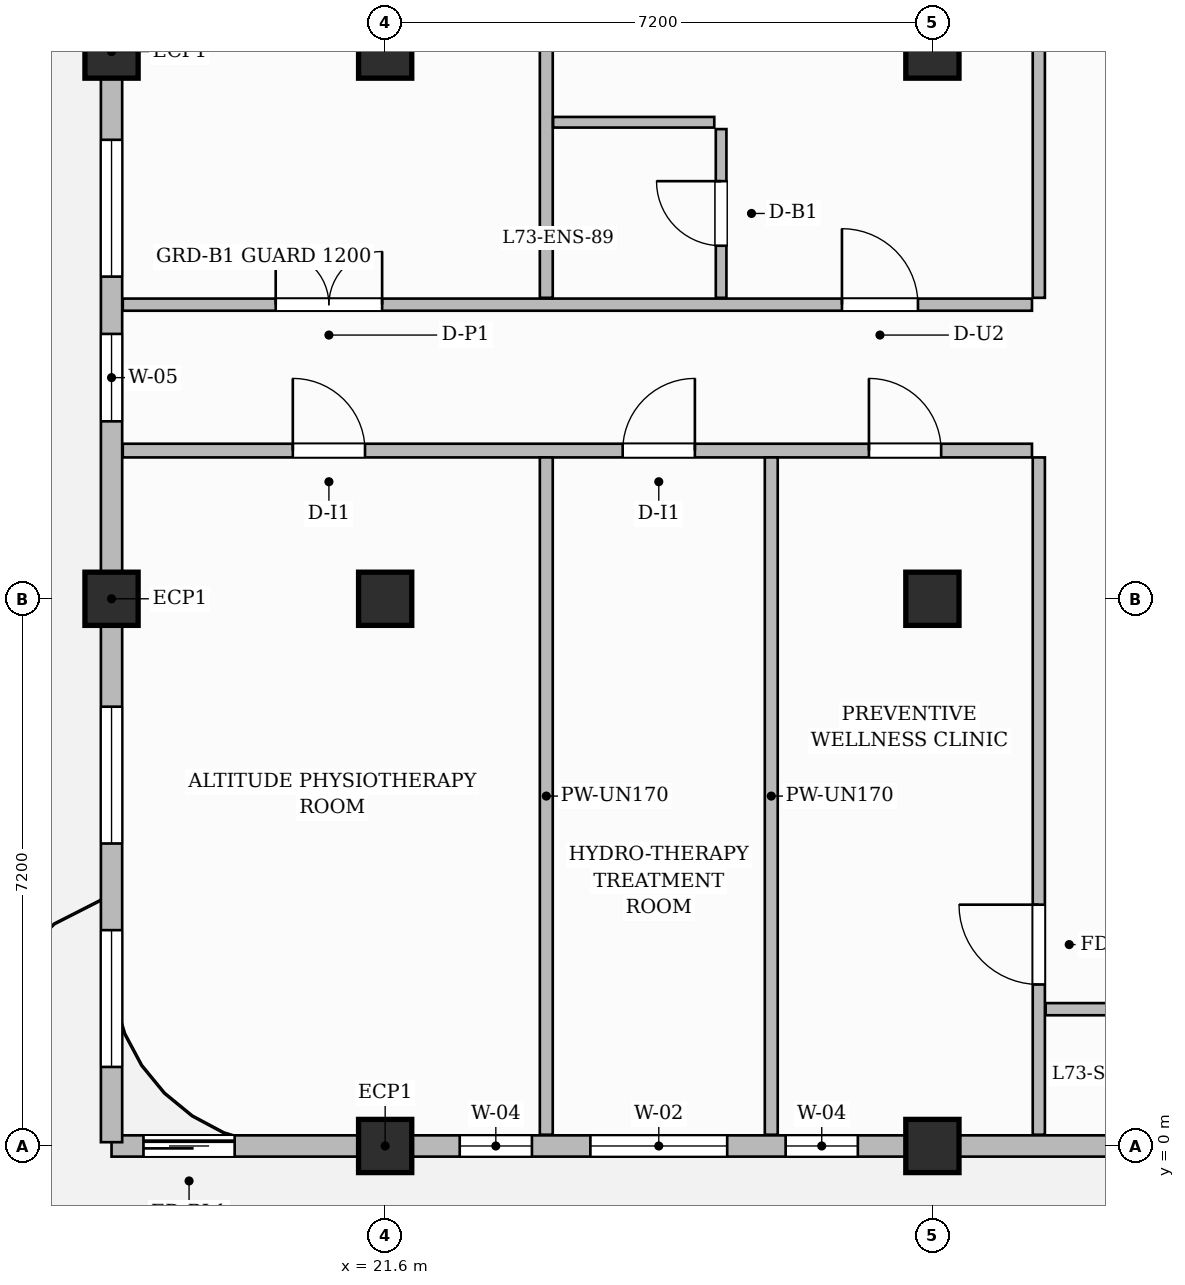
"""IFC4 building model, lengths in metres.
Left out: names, types, materials, properties, quantities, classifications, styles, units other than length and angle.
Written with IfcOpenShell. Run it as: python <this file> out.ifc"""

import sys

from ifc_helpers import new_model, si_unit, direction, frame, frame_2d, origin, origin_2d, place, context, subcontext, project, spatial, rectangle, extrude, source, transform, mapped, element, fill, save


model = new_model("IFC4")
c1 = context("Model", 3, precision=1e-05, world=origin(), true_north=direction((0.0, 1.0)))
c2 = subcontext(c1, "Body", "Model", "MODEL_VIEW")
j1 = project(units=[si_unit("LENGTHUNIT", "METRE"), si_unit("PLANEANGLEUNIT", "RADIAN")], contexts=[c1])
p1 = place(None, origin())
s1 = spatial("IfcSite", under=j1, at=p1, CompositionType="ELEMENT")
p2 = place(p1, origin())
s2 = spatial("IfcBuilding", under=s1, at=p2, CompositionType="ELEMENT")
p3 = place(p2, frame((0.0, 0.0, 290.45)))
s3 = spatial("IfcBuildingStorey", under=s2, at=p3, CompositionType="ELEMENT", Elevation=290.45)
m1 = source(origin(), c2, "Body", "SweptSolid", [
    extrude(rectangle(XDim=0.7, YDim=0.7, at=origin_2d()), origin(), (0.0, 0.0, 1.0), 3.85),
])
for number, where, z_axis, x_axis in (
    (1, (21.6, 0.0, 0.0), (0.0, 0.0, 1.0), (1.0, 0.0, 0.0)),
    (2, (21.6, 7.2, 0.0), (0.0, 0.0, 1.0), (1.0, 0.0, 0.0)),
    (3, (21.6, 14.4, 0.0), (0.0, 0.0, 1.0), (1.0, 0.0, 0.0)),
    (4, (28.8, 0.0, 0.0), (0.0, 0.0, 1.0), (1.0, 0.0, 0.0)),
    (5, (28.8, 7.2, 0.0), (0.0, 0.0, 1.0), (1.0, 0.0, 0.0)),
    (6, (28.8, 14.4, 0.0), (0.0, 0.0, 1.0), (1.0, 0.0, 0.0)),
    (7, (18.0, 7.2, 0.0), (0.0, 0.0, 1.0), (1.0, 0.0, 0.0)),
    (8, (18.0, 14.4, 0.0), (0.0, 0.0, 1.0), (1.0, 0.0, 0.0)),
):
    element("IfcColumn", number, at=place(p3, frame(where, z_axis=z_axis, x_axis=x_axis)), inside=s3, PredefinedType="COLUMN", context=c2, shape_type="MappedRepresentation", body=[
        mapped(m1, transform((0.0, 0.0, 0.0), scale=1.0)),
    ])
p4 = place(p3, frame((18.148, 9.15, 0.0), z_axis=(0.0, 0.0, 1.0), x_axis=(1.0, 0.0, 0.0)))
e9 = element("IfcWall", 9, at=p4, inside=s3, PredefinedType="PARTITIONING", context=c2, shape_type="SweptSolid", body=[
    extrude(rectangle(XDim=11.962, YDim=0.18, at=frame_2d((5.981, 0.0))), origin(), (0.0, 0.0, 1.0), 3.55),
])
p5 = place(p4, frame((2.237, 0.0, 0.0)))
e10 = element("IfcOpeningElement", 10, at=p5, cuts=e9, PredefinedType="OPENING", context=c2, shape_type="SweptSolid", body=[
    extrude(rectangle(XDim=0.95, YDim=2.15, at=frame_2d((0.475, 1.075))), frame((0.0, 0.1, 0.0), z_axis=(0.0, -1.0, 0.0), x_axis=(1.0, 0.0, 0.0)), (0.0, 0.0, 1.0), 0.2),
])
p6 = place(p4, frame((6.577, 0.0, 0.0)))
e11 = element("IfcOpeningElement", 11, at=p6, cuts=e9, PredefinedType="OPENING", context=c2, shape_type="SweptSolid", body=[
    extrude(rectangle(XDim=0.95, YDim=2.15, at=frame_2d((0.475, 1.075))), frame((0.0, 0.1, 0.0), z_axis=(0.0, -1.0, 0.0), x_axis=(1.0, 0.0, 0.0)), (0.0, 0.0, 1.0), 0.2),
])
p7 = place(p4, frame((9.817, 0.0, 0.0)))
e12 = element("IfcOpeningElement", 12, at=p7, cuts=e9, PredefinedType="OPENING", context=c2, shape_type="SweptSolid", body=[
    extrude(rectangle(XDim=0.95, YDim=2.15, at=frame_2d((0.475, 1.075))), frame((0.0, 0.1, 0.0), z_axis=(0.0, -1.0, 0.0), x_axis=(1.0, 0.0, 0.0)), (0.0, 0.0, 1.0), 0.2),
])
p8 = place(p3, frame((18.148, 11.07, 0.0), z_axis=(0.0, 0.0, 1.0), x_axis=(1.0, 0.0, 0.0)))
e13 = element("IfcWall", 13, at=p8, inside=s3, PredefinedType="PARTITIONING", context=c2, shape_type="SweptSolid", body=[
    extrude(rectangle(XDim=11.962, YDim=0.16, at=frame_2d((5.981, 0.0))), origin(), (0.0, 0.0, 1.0), 3.55),
])
p9 = place(p8, frame((2.012, 0.0, 0.0)))
e14 = element("IfcOpeningElement", 14, at=p9, cuts=e13, PredefinedType="OPENING", context=c2, shape_type="SweptSolid", body=[
    extrude(rectangle(XDim=1.4, YDim=2.35, at=frame_2d((0.7, 1.175))), frame((0.0, 0.09, 0.0), z_axis=(0.0, -1.0, 0.0), x_axis=(1.0, 0.0, 0.0)), (0.0, 0.0, 1.0), 0.18),
])
p10 = place(p8, frame((9.462, 0.0, 0.0)))
e15 = element("IfcOpeningElement", 15, at=p10, cuts=e13, PredefinedType="OPENING", context=c2, shape_type="SweptSolid", body=[
    extrude(rectangle(XDim=1.0, YDim=2.2, at=frame_2d((0.5, 1.1))), frame((0.0, 0.09, 0.0), z_axis=(0.0, -1.0, 0.0), x_axis=(1.0, 0.0, 0.0)), (0.0, 0.0, 1.0), 0.18),
])
p11 = place(p3, frame((30.2, 11.16, 0.0), z_axis=(0.0, 0.0, 1.0), x_axis=(0.0, 1.0, 0.0)))
e16 = element("IfcWall", 16, at=p11, inside=s3, PredefinedType="PARTITIONING", context=c2, shape_type="SweptSolid", body=[
    extrude(rectangle(XDim=10.3, YDim=0.16, at=frame_2d((5.15, 0.0))), origin(), (0.0, 0.0, 1.0), 3.55),
])
p12 = place(p3, frame((30.2, 0.148, 0.0), z_axis=(0.0, 0.0, 1.0), x_axis=(0.0, 1.0, 0.0)))
e17 = element("IfcWall", 17, at=p12, inside=s3, PredefinedType="PARTITIONING", context=c2, shape_type="SweptSolid", body=[
    extrude(rectangle(XDim=8.912, YDim=0.16, at=frame_2d((4.456, 0.0))), origin(), (0.0, 0.0, 1.0), 3.55),
])
p13 = place(p12, frame((1.977, 0.0, 0.0)))
e18 = element("IfcOpeningElement", 18, at=p13, cuts=e17, PredefinedType="OPENING", context=c2, shape_type="SweptSolid", body=[
    extrude(rectangle(XDim=1.05, YDim=2.15, at=frame_2d((0.525, 1.075))), frame((0.0, 0.09, 0.0), z_axis=(0.0, -1.0, 0.0), x_axis=(1.0, 0.0, 0.0)), (0.0, 0.0, 1.0), 0.18),
])
p14 = place(p3, frame((30.29, 1.8, 0.0), z_axis=(0.0, 0.0, 1.0), x_axis=(1.0, 0.0, 0.0)))
e19 = element("IfcWall", 19, at=p14, inside=s3, PredefinedType="PARTITIONING", context=c2, shape_type="SweptSolid", body=[
    extrude(rectangle(XDim=19.37, YDim=0.16, at=frame_2d((9.685, 0.0))), origin(), (0.0, 0.0, 1.0), 3.55),
])
p15 = place(p14, frame((5.074, 0.0, 0.0)))
e20 = element("IfcOpeningElement", 20, at=p15, cuts=e19, PredefinedType="OPENING", context=c2, shape_type="SweptSolid", body=[
    extrude(rectangle(XDim=0.9, YDim=2.15, at=frame_2d((0.45, 1.075))), frame((0.0, 0.09, 0.0), z_axis=(0.0, -1.0, 0.0), x_axis=(1.0, 0.0, 0.0)), (0.0, 0.0, 1.0), 0.18),
])
p16 = place(p14, frame((14.06, 0.0, 0.0)))
e21 = element("IfcOpeningElement", 21, at=p16, cuts=e19, PredefinedType="OPENING", context=c2, shape_type="SweptSolid", body=[
    extrude(rectangle(XDim=0.9, YDim=2.15, at=frame_2d((0.45, 1.075))), frame((0.0, 0.09, 0.0), z_axis=(0.0, -1.0, 0.0), x_axis=(1.0, 0.0, 0.0)), (0.0, 0.0, 1.0), 0.18),
])
for number, where, z_axis, x_axis in (
    (22, (23.72, 0.148, 0.0), (0.0, 0.0, 1.0), (0.0, 1.0, 0.0)),
    (23, (26.68, 0.148, 0.0), (0.0, 0.0, 1.0), (0.0, 1.0, 0.0)),
):
    element("IfcWall", number, at=place(p3, frame(where, z_axis=z_axis, x_axis=x_axis)), inside=s3, PredefinedType="PARTITIONING", context=c2, shape_type="SweptSolid", body=[
        extrude(rectangle(XDim=8.912, YDim=0.17, at=frame_2d((4.456, 0.0))), origin(), (0.0, 0.0, 1.0), 3.55),
    ])
p17 = place(p3, frame((23.72, 11.16, 0.0), z_axis=(0.0, 0.0, 1.0), x_axis=(0.0, 1.0, 0.0)))
e24 = element("IfcWall", 24, at=p17, inside=s3, PredefinedType="PARTITIONING", context=c2, shape_type="SweptSolid", body=[
    extrude(rectangle(XDim=10.292, YDim=0.17, at=frame_2d((5.146, 0.0))), origin(), (0.0, 0.0, 1.0), 3.55),
])
p18 = place(p3, frame((26.02, 11.16, 0.0), z_axis=(0.0, 0.0, 1.0), x_axis=(0.0, 1.0, 0.0)))
e25 = element("IfcWall", 25, at=p18, inside=s3, PredefinedType="PARTITIONING", context=c2, shape_type="SweptSolid", body=[
    extrude(rectangle(XDim=2.22, YDim=0.14, at=frame_2d((1.11, 0.0))), origin(), (0.0, 0.0, 1.0), 3.55),
])
p19 = place(p18, frame((0.685, 0.0, 0.0)))
e26 = element("IfcOpeningElement", 26, at=p19, cuts=e25, PredefinedType="OPENING", context=c2, shape_type="SweptSolid", body=[
    extrude(rectangle(XDim=0.85, YDim=2.1, at=frame_2d((0.425, 1.05))), frame((0.0, 0.08, 0.0), z_axis=(0.0, -1.0, 0.0), x_axis=(1.0, 0.0, 0.0)), (0.0, 0.0, 1.0), 0.16),
])
p20 = place(p3, frame((23.81, 13.47, 0.0), z_axis=(0.0, 0.0, 1.0), x_axis=(1.0, 0.0, 0.0)))
e27 = element("IfcWall", 27, at=p20, inside=s3, PredefinedType="PARTITIONING", context=c2, shape_type="SweptSolid", body=[
    extrude(rectangle(XDim=2.12, YDim=0.14, at=frame_2d((1.06, 0.0))), origin(), (0.0, 0.0, 1.0), 3.55),
])
p21 = place(p3, frame((18.0, 0.0, 0.0), z_axis=(0.0, 0.0, 1.0), x_axis=(1.0, 0.0, 0.0)))
e28 = element("IfcWall", 28, at=p21, inside=s3, PredefinedType="SOLIDWALL", context=c2, shape_type="SweptSolid", body=[
    extrude(rectangle(XDim=31.8, YDim=0.28, at=frame_2d((15.9, 0.0))), origin(), (0.0, 0.0, 1.0), 3.135),
])
p22 = place(p21, frame((0.42, 0.0, 0.0)))
e29 = element("IfcOpeningElement", 29, at=p22, cuts=e28, PredefinedType="OPENING", context=c2, shape_type="SweptSolid", body=[
    extrude(rectangle(XDim=1.2, YDim=2.2, at=frame_2d((0.6, 1.1))), frame((0.0, 0.15, 0.0), z_axis=(0.0, -1.0, 0.0), x_axis=(1.0, 0.0, 0.0)), (0.0, 0.0, 1.0), 0.3),
])
p23 = place(p21, frame((4.581, 0.0, 0.8)))
e30 = element("IfcOpeningElement", 30, at=p23, cuts=e28, PredefinedType="OPENING", context=c2, shape_type="SweptSolid", body=[
    extrude(rectangle(XDim=0.95, YDim=1.75, at=frame_2d((0.475, 0.875))), frame((0.0, 0.15, 0.0), z_axis=(0.0, -1.0, 0.0), x_axis=(1.0, 0.0, 0.0)), (0.0, 0.0, 1.0), 0.3),
])
p24 = place(p21, frame((6.3, 0.0, 0.8)))
e31 = element("IfcOpeningElement", 31, at=p24, cuts=e28, PredefinedType="OPENING", context=c2, shape_type="SweptSolid", body=[
    extrude(rectangle(XDim=1.8, YDim=1.85, at=frame_2d((0.9, 0.925))), frame((0.0, 0.15, 0.0), z_axis=(0.0, -1.0, 0.0), x_axis=(1.0, 0.0, 0.0)), (0.0, 0.0, 1.0), 0.3),
])
p25 = place(p21, frame((8.869, 0.0, 0.8)))
e32 = element("IfcOpeningElement", 32, at=p25, cuts=e28, PredefinedType="OPENING", context=c2, shape_type="SweptSolid", body=[
    extrude(rectangle(XDim=0.95, YDim=1.75, at=frame_2d((0.475, 0.875))), frame((0.0, 0.15, 0.0), z_axis=(0.0, -1.0, 0.0), x_axis=(1.0, 0.0, 0.0)), (0.0, 0.0, 1.0), 0.3),
])
p26 = place(p21, frame((13.204, 0.0, 0.8)))
e33 = element("IfcOpeningElement", 33, at=p26, cuts=e28, PredefinedType="OPENING", context=c2, shape_type="SweptSolid", body=[
    extrude(rectangle(XDim=1.8, YDim=1.85, at=frame_2d((0.9, 0.925))), frame((0.0, 0.15, 0.0), z_axis=(0.0, -1.0, 0.0), x_axis=(1.0, 0.0, 0.0)), (0.0, 0.0, 1.0), 0.3),
])
p27 = place(p21, frame((18.796, 0.0, 0.8)))
e34 = element("IfcOpeningElement", 34, at=p27, cuts=e28, PredefinedType="OPENING", context=c2, shape_type="SweptSolid", body=[
    extrude(rectangle(XDim=1.8, YDim=1.85, at=frame_2d((0.9, 0.925))), frame((0.0, 0.15, 0.0), z_axis=(0.0, -1.0, 0.0), x_axis=(1.0, 0.0, 0.0)), (0.0, 0.0, 1.0), 0.3),
])
p28 = place(p21, frame((22.029, 0.0, 0.8)))
e35 = element("IfcOpeningElement", 35, at=p28, cuts=e28, PredefinedType="OPENING", context=c2, shape_type="SweptSolid", body=[
    extrude(rectangle(XDim=0.95, YDim=1.75, at=frame_2d((0.475, 0.875))), frame((0.0, 0.15, 0.0), z_axis=(0.0, -1.0, 0.0), x_axis=(1.0, 0.0, 0.0)), (0.0, 0.0, 1.0), 0.3),
])
p29 = place(p21, frame((25.475, 0.0, 0.8)))
e36 = element("IfcOpeningElement", 36, at=p29, cuts=e28, PredefinedType="OPENING", context=c2, shape_type="SweptSolid", body=[
    extrude(rectangle(XDim=1.8, YDim=1.85, at=frame_2d((0.9, 0.925))), frame((0.0, 0.15, 0.0), z_axis=(0.0, -1.0, 0.0), x_axis=(1.0, 0.0, 0.0)), (0.0, 0.0, 1.0), 0.3),
])
p30 = place(p21, frame((28.525, 0.0, 0.8)))
e37 = element("IfcOpeningElement", 37, at=p30, cuts=e28, PredefinedType="OPENING", context=c2, shape_type="SweptSolid", body=[
    extrude(rectangle(XDim=1.8, YDim=1.85, at=frame_2d((0.9, 0.925))), frame((0.0, 0.15, 0.0), z_axis=(0.0, -1.0, 0.0), x_axis=(1.0, 0.0, 0.0)), (0.0, 0.0, 1.0), 0.3),
])
p31 = place(p3, frame((18.0, 0.05, 0.0), z_axis=(0.0, 0.0, 1.0), x_axis=(0.0, 1.0, 0.0)))
e38 = element("IfcWall", 38, at=p31, inside=s3, PredefinedType="SOLIDWALL", context=c2, shape_type="SweptSolid", body=[
    extrude(rectangle(XDim=21.5, YDim=0.28, at=frame_2d((10.75, 0.0))), origin(), (0.0, 0.0, 1.0), 3.55),
])
p32 = place(p31, frame((0.99, 0.0, 0.8)))
e39 = element("IfcOpeningElement", 39, at=p32, cuts=e38, PredefinedType="OPENING", context=c2, shape_type="SweptSolid", body=[
    extrude(rectangle(XDim=1.8, YDim=1.85, at=frame_2d((0.9, 0.925))), frame((0.0, 0.15, 0.0), z_axis=(0.0, -1.0, 0.0), x_axis=(1.0, 0.0, 0.0)), (0.0, 0.0, 1.0), 0.3),
])
p33 = place(p31, frame((3.93, 0.0, 0.8)))
e40 = element("IfcOpeningElement", 40, at=p33, cuts=e38, PredefinedType="OPENING", context=c2, shape_type="SweptSolid", body=[
    extrude(rectangle(XDim=1.8, YDim=1.85, at=frame_2d((0.9, 0.925))), frame((0.0, 0.15, 0.0), z_axis=(0.0, -1.0, 0.0), x_axis=(1.0, 0.0, 0.0)), (0.0, 0.0, 1.0), 0.3),
])
p34 = place(p31, frame((9.485, 0.0, 0.8)))
e41 = element("IfcOpeningElement", 41, at=p34, cuts=e38, PredefinedType="OPENING", context=c2, shape_type="SweptSolid", body=[
    extrude(rectangle(XDim=1.15, YDim=1.8, at=frame_2d((0.575, 0.9))), frame((0.0, 0.15, 0.0), z_axis=(0.0, -1.0, 0.0), x_axis=(1.0, 0.0, 0.0)), (0.0, 0.0, 1.0), 0.3),
])
p35 = place(p31, frame((11.389, 0.0, 0.8)))
e42 = element("IfcOpeningElement", 42, at=p35, cuts=e38, PredefinedType="OPENING", context=c2, shape_type="SweptSolid", body=[
    extrude(rectangle(XDim=1.8, YDim=1.85, at=frame_2d((0.9, 0.925))), frame((0.0, 0.15, 0.0), z_axis=(0.0, -1.0, 0.0), x_axis=(1.0, 0.0, 0.0)), (0.0, 0.0, 1.0), 0.3),
])
p36 = place(p31, frame((15.77, 0.0, 0.8)))
e43 = element("IfcOpeningElement", 43, at=p36, cuts=e38, PredefinedType="OPENING", context=c2, shape_type="SweptSolid", body=[
    extrude(rectangle(XDim=1.8, YDim=1.85, at=frame_2d((0.9, 0.925))), frame((0.0, 0.15, 0.0), z_axis=(0.0, -1.0, 0.0), x_axis=(1.0, 0.0, 0.0)), (0.0, 0.0, 1.0), 0.3),
])
p37 = place(p31, frame((18.71, 0.0, 0.8)))
e44 = element("IfcOpeningElement", 44, at=p37, cuts=e38, PredefinedType="OPENING", context=c2, shape_type="SweptSolid", body=[
    extrude(rectangle(XDim=1.8, YDim=1.85, at=frame_2d((0.9, 0.925))), frame((0.0, 0.15, 0.0), z_axis=(0.0, -1.0, 0.0), x_axis=(1.0, 0.0, 0.0)), (0.0, 0.0, 1.0), 0.3),
])
m2 = source(origin(), c2, "Body", "SweptSolid", [
    extrude(rectangle(XDim=1.05, YDim=2.15, at=frame_2d((0.525, 1.075))), frame((0.0, 0.025, 0.0), z_axis=(0.0, -1.0, 0.0), x_axis=(1.0, 0.0, 0.0)), (0.0, 0.0, 1.0), 0.05),
])
p38 = place(p13, origin())
e45 = element("IfcDoor", 45, at=p38, inside=s3, OperationType="SINGLE_SWING_RIGHT", PredefinedType="DOOR", context=c2, shape_type="MappedRepresentation", body=[
    mapped(m2, transform((0.0, 0.0, 0.0), scale=1.0)),
])
fill(e18, e45)
m3 = source(origin(), c2, "Body", "SweptSolid", [
    extrude(rectangle(XDim=0.95, YDim=2.15, at=frame_2d((0.475, 1.075))), frame((0.0, 0.025, 0.0), z_axis=(0.0, -1.0, 0.0), x_axis=(1.0, 0.0, 0.0)), (0.0, 0.0, 1.0), 0.05),
])
p39 = place(p5, origin())
e46 = element("IfcDoor", 46, at=p39, inside=s3, OperationType="SINGLE_SWING_LEFT", PredefinedType="DOOR", context=c2, shape_type="MappedRepresentation", body=[
    mapped(m3, transform((0.0, 0.0, 0.0), scale=1.0)),
])
fill(e10, e46)
p40 = place(p6, origin())
e47 = element("IfcDoor", 47, at=p40, inside=s3, OperationType="SINGLE_SWING_RIGHT", PredefinedType="DOOR", context=c2, shape_type="MappedRepresentation", body=[
    mapped(m3, transform((0.0, 0.0, 0.0), scale=1.0)),
])
fill(e11, e47)
p41 = place(p7, origin())
e48 = element("IfcDoor", 48, at=p41, inside=s3, OperationType="SINGLE_SWING_LEFT", PredefinedType="DOOR", context=c2, shape_type="MappedRepresentation", body=[
    mapped(m3, transform((0.0, 0.0, 0.0), scale=1.0)),
])
fill(e12, e48)
m4 = source(origin(), c2, "Body", "SweptSolid", [
    extrude(rectangle(XDim=1.4, YDim=2.35, at=frame_2d((0.7, 1.175))), frame((0.0, 0.025, 0.0), z_axis=(0.0, -1.0, 0.0), x_axis=(1.0, 0.0, 0.0)), (0.0, 0.0, 1.0), 0.05),
])
p42 = place(p9, origin())
e49 = element("IfcDoor", 49, at=p42, inside=s3, OperationType="DOUBLE_DOOR_SINGLE_SWING", PredefinedType="DOOR", context=c2, shape_type="MappedRepresentation", body=[
    mapped(m4, transform((0.0, 0.0, 0.0), scale=1.0)),
])
fill(e14, e49)
m5 = source(origin(), c2, "Body", "SweptSolid", [
    extrude(rectangle(XDim=0.85, YDim=2.1, at=frame_2d((0.425, 1.05))), frame((0.0, 0.025, 0.0), z_axis=(0.0, -1.0, 0.0), x_axis=(1.0, 0.0, 0.0)), (0.0, 0.0, 1.0), 0.05),
])
p43 = place(p19, origin())
e50 = element("IfcDoor", 50, at=p43, inside=s3, OperationType="SINGLE_SWING_RIGHT", PredefinedType="DOOR", context=c2, shape_type="MappedRepresentation", body=[
    mapped(m5, transform((0.0, 0.0, 0.0), scale=1.0)),
])
fill(e26, e50)
m6 = source(origin(), c2, "Body", "SweptSolid", [
    extrude(rectangle(XDim=1.0, YDim=2.2, at=frame_2d((0.5, 1.1))), frame((0.0, 0.025, 0.0), z_axis=(0.0, -1.0, 0.0), x_axis=(1.0, 0.0, 0.0)), (0.0, 0.0, 1.0), 0.05),
])
p44 = place(p10, origin())
e51 = element("IfcDoor", 51, at=p44, inside=s3, OperationType="SINGLE_SWING_LEFT", PredefinedType="DOOR", context=c2, shape_type="MappedRepresentation", body=[
    mapped(m6, transform((0.0, 0.0, 0.0), scale=1.0)),
])
fill(e15, e51)
m7 = source(origin(), c2, "Body", "SweptSolid", [
    extrude(rectangle(XDim=1.2, YDim=2.2, at=frame_2d((0.6, 1.1))), frame((0.0, 0.025, 0.0), z_axis=(0.0, -1.0, 0.0), x_axis=(1.0, 0.0, 0.0)), (0.0, 0.0, 1.0), 0.05),
])
p45 = place(p22, origin())
e52 = element("IfcDoor", 52, at=p45, inside=s3, OperationType="SLIDING_TO_LEFT", PredefinedType="DOOR", context=c2, shape_type="MappedRepresentation", body=[
    mapped(m7, transform((0.0, 0.0, 0.0), scale=1.0)),
])
fill(e29, e52)
m8 = source(origin(), c2, "Body", "SweptSolid", [
    extrude(rectangle(XDim=0.95, YDim=1.75, at=frame_2d((0.475, 0.875))), frame((0.0, 0.03, 0.0), z_axis=(0.0, -1.0, 0.0), x_axis=(1.0, 0.0, 0.0)), (0.0, 0.0, 1.0), 0.06),
])
p46 = place(p23, origin())
e53 = element("IfcWindow", 53, at=p46, inside=s3, PartitioningType="SINGLE_PANEL", PredefinedType="WINDOW", context=c2, shape_type="MappedRepresentation", body=[
    mapped(m8, transform((0.0, 0.0, 0.0), scale=1.0)),
])
fill(e30, e53)
m9 = source(origin(), c2, "Body", "SweptSolid", [
    extrude(rectangle(XDim=1.8, YDim=1.85, at=frame_2d((0.9, 0.925))), frame((0.0, 0.03, 0.0), z_axis=(0.0, -1.0, 0.0), x_axis=(1.0, 0.0, 0.0)), (0.0, 0.0, 1.0), 0.06),
])
p47 = place(p24, origin())
e54 = element("IfcWindow", 54, at=p47, inside=s3, PartitioningType="DOUBLE_PANEL_VERTICAL", PredefinedType="WINDOW", context=c2, shape_type="MappedRepresentation", body=[
    mapped(m9, transform((0.0, 0.0, 0.0), scale=1.0)),
])
fill(e31, e54)
p48 = place(p25, origin())
e55 = element("IfcWindow", 55, at=p48, inside=s3, PartitioningType="SINGLE_PANEL", PredefinedType="WINDOW", context=c2, shape_type="MappedRepresentation", body=[
    mapped(m8, transform((0.0, 0.0, 0.0), scale=1.0)),
])
fill(e32, e55)
p49 = place(p32, origin())
e56 = element("IfcWindow", 56, at=p49, inside=s3, PartitioningType="DOUBLE_PANEL_VERTICAL", PredefinedType="WINDOW", context=c2, shape_type="MappedRepresentation", body=[
    mapped(m9, transform((0.0, 0.0, 0.0), scale=1.0)),
])
fill(e39, e56)
p50 = place(p33, origin())
e57 = element("IfcWindow", 57, at=p50, inside=s3, PartitioningType="DOUBLE_PANEL_VERTICAL", PredefinedType="WINDOW", context=c2, shape_type="MappedRepresentation", body=[
    mapped(m9, transform((0.0, 0.0, 0.0), scale=1.0)),
])
fill(e40, e57)
m10 = source(origin(), c2, "Body", "SweptSolid", [
    extrude(rectangle(XDim=1.15, YDim=1.8, at=frame_2d((0.575, 0.9))), frame((0.0, 0.03, 0.0), z_axis=(0.0, -1.0, 0.0), x_axis=(1.0, 0.0, 0.0)), (0.0, 0.0, 1.0), 0.06),
])
p51 = place(p34, origin())
e58 = element("IfcWindow", 58, at=p51, inside=s3, PartitioningType="SINGLE_PANEL", PredefinedType="WINDOW", context=c2, shape_type="MappedRepresentation", body=[
    mapped(m10, transform((0.0, 0.0, 0.0), scale=1.0)),
])
fill(e41, e58)
p52 = place(p35, origin())
e59 = element("IfcWindow", 59, at=p52, inside=s3, PartitioningType="DOUBLE_PANEL_VERTICAL", PredefinedType="WINDOW", context=c2, shape_type="MappedRepresentation", body=[
    mapped(m9, transform((0.0, 0.0, 0.0), scale=1.0)),
])
fill(e42, e59)
save(model, sys.argv[1])
